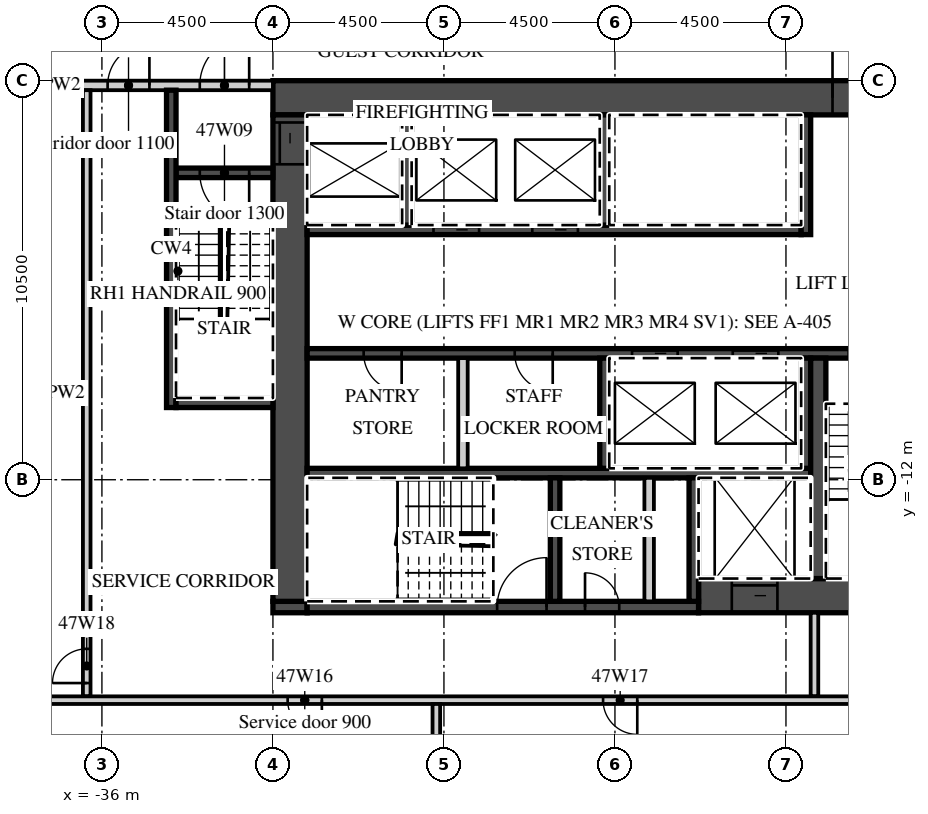
"""IFC4 building model, lengths in metres.
Left out: names, types, materials, properties, quantities, classifications, styles, units other than length and angle.
Written with IfcOpenShell. Run it as: python <this file> out.ifc"""

import sys

from ifc_helpers import new_model, si_unit, direction, frame, frame_2d, origin, place, context, subcontext, project, spatial, rectangle, extrude, element, fill, save


model = new_model("IFC4")
c1 = context("Model", 3, precision=1e-05, world=origin(), true_north=direction((0.0, 1.0)))
c2 = subcontext(c1, "Body", "Model", "MODEL_VIEW")
j1 = project(units=[si_unit("LENGTHUNIT", "METRE"), si_unit("PLANEANGLEUNIT", "RADIAN")], contexts=[c1])
p1 = place(None, origin())
s1 = spatial("IfcSite", under=j1, at=p1, CompositionType="ELEMENT")
p2 = place(p1, origin())
s2 = spatial("IfcBuilding", under=s1, at=p2, CompositionType="ELEMENT")
p3 = place(p2, frame((0.0, 0.0, 196.6)))
s3 = spatial("IfcBuildingStorey", under=s2, at=p3, CompositionType="ELEMENT", Elevation=196.6)
p4 = place(p3, frame((-31.5, -1.95, 0.0), z_axis=(0.0, 0.0, 1.0), x_axis=(1.0, 0.0, 0.0)))
e1 = element("IfcWall", 1, at=p4, inside=s3, PredefinedType="SHEAR", context=c2, shape_type="SweptSolid", body=[
    extrude(rectangle(XDim=18.0, YDim=0.9, at=frame_2d((9.0, 0.0))), origin(), (0.0, 0.0, 1.0), 3.02),
])
p5 = place(p4, frame((14.725, 0.0, 0.0)))
e2 = element("IfcOpeningElement", 2, at=p5, cuts=e1, PredefinedType="OPENING", context=c2, shape_type="SweptSolid", body=[
    extrude(rectangle(XDim=1.8, YDim=2.1, at=frame_2d((0.9, 1.05))), frame((0.0, 0.46, 0.0), z_axis=(0.0, -1.0, 0.0), x_axis=(1.0, 0.0, 0.0)), (0.0, 0.0, 1.0), 0.92),
])
p6 = place(p3, frame((-20.3, -15.05, 0.0), z_axis=(0.0, 0.0, 1.0), x_axis=(1.0, 0.0, 0.0)))
e3 = element("IfcWall", 3, at=p6, inside=s3, PredefinedType="SHEAR", context=c2, shape_type="SweptSolid", body=[
    extrude(rectangle(XDim=6.8, YDim=0.9, at=frame_2d((3.4, 0.0))), origin(), (0.0, 0.0, 1.0), 3.02),
])
p7 = place(p6, frame((0.875, 0.0, 0.0)))
e4 = element("IfcOpeningElement", 4, at=p7, cuts=e3, PredefinedType="OPENING", context=c2, shape_type="SweptSolid", body=[
    extrude(rectangle(XDim=1.2, YDim=2.1, at=frame_2d((0.6, 1.05))), frame((0.0, 0.46, 0.0), z_axis=(0.0, -1.0, 0.0), x_axis=(1.0, 0.0, 0.0)), (0.0, 0.0, 1.0), 0.92),
])
p8 = place(p3, frame((-31.5, -15.35, 0.0), z_axis=(0.0, 0.0, 1.0), x_axis=(1.0, 0.0, 0.0)))
e5 = element("IfcWall", 5, at=p8, inside=s3, PredefinedType="SHEAR", context=c2, shape_type="SweptSolid", body=[
    extrude(rectangle(XDim=0.9, YDim=0.3, at=frame_2d((0.45, 0.0))), origin(), (0.0, 0.0, 1.0), 3.02),
])
p9 = place(p3, frame((-30.6, -15.35, 0.0), z_axis=(0.0, 0.0, 1.0), x_axis=(1.0, 0.0, 0.0)))
e6 = element("IfcWall", 6, at=p9, inside=s3, PredefinedType="SHEAR", context=c2, shape_type="SweptSolid", body=[
    extrude(rectangle(XDim=10.3, YDim=0.3, at=frame_2d((5.15, 0.0))), origin(), (0.0, 0.0, 1.0), 3.02),
])
p10 = place(p9, frame((5.0, 0.0, 0.0)))
e7 = element("IfcOpeningElement", 7, at=p10, cuts=e6, PredefinedType="OPENING", context=c2, shape_type="SweptSolid", body=[
    extrude(rectangle(XDim=1.3, YDim=2.1, at=frame_2d((0.65, 1.05))), frame((0.0, 0.16, 0.0), z_axis=(0.0, -1.0, 0.0), x_axis=(1.0, 0.0, 0.0)), (0.0, 0.0, 1.0), 0.32),
])
p11 = place(p9, frame((7.312, 0.0, 0.0)))
e8 = element("IfcOpeningElement", 8, at=p11, cuts=e6, PredefinedType="OPENING", context=c2, shape_type="SweptSolid", body=[
    extrude(rectangle(XDim=0.9, YDim=2.1, at=frame_2d((0.45, 1.05))), frame((0.0, 0.16, 0.0), z_axis=(0.0, -1.0, 0.0), x_axis=(1.0, 0.0, 0.0)), (0.0, 0.0, 1.0), 0.32),
])
p12 = place(p3, frame((-31.05, -15.2, 0.0), z_axis=(0.0, 0.0, 1.0), x_axis=(0.0, 1.0, 0.0)))
e9 = element("IfcWall", 9, at=p12, inside=s3, PredefinedType="SHEAR", context=c2, shape_type="SweptSolid", body=[
    extrude(rectangle(XDim=12.8, YDim=0.9, at=frame_2d((6.4, 0.0))), origin(), (0.0, 0.0, 1.0), 3.02),
])
p13 = place(p12, frame((11.5, 0.0, 0.0)))
e10 = element("IfcOpeningElement", 10, at=p13, cuts=e9, PredefinedType="OPENING", context=c2, shape_type="SweptSolid", body=[
    extrude(rectangle(XDim=1.1, YDim=2.1, at=frame_2d((0.55, 1.05))), frame((0.0, 0.46, 0.0), z_axis=(0.0, -1.0, 0.0), x_axis=(1.0, 0.0, 0.0)), (0.0, 0.0, 1.0), 0.92),
])
p14 = place(p3, frame((-30.6, -5.425, 0.0), z_axis=(0.0, 0.0, 1.0), x_axis=(1.0, 0.0, 0.0)))
e11 = element("IfcWall", 11, at=p14, inside=s3, PredefinedType="SHEAR", context=c2, shape_type="SweptSolid", body=[
    extrude(rectangle(XDim=13.0, YDim=0.25, at=frame_2d((6.5, 0.0))), origin(), (0.0, 0.0, 1.0), 3.02),
])
p15 = place(p14, frame((3.325, 0.0, 0.0)))
e12 = element("IfcOpeningElement", 12, at=p15, cuts=e11, PredefinedType="OPENING", context=c2, shape_type="SweptSolid", body=[
    extrude(rectangle(XDim=1.2, YDim=2.1, at=frame_2d((0.6, 1.05))), frame((0.0, 0.135, 0.0), z_axis=(0.0, -1.0, 0.0), x_axis=(1.0, 0.0, 0.0)), (0.0, 0.0, 1.0), 0.27),
])
p16 = place(p14, frame((5.925, 0.0, 0.0)))
e13 = element("IfcOpeningElement", 13, at=p16, cuts=e11, PredefinedType="OPENING", context=c2, shape_type="SweptSolid", body=[
    extrude(rectangle(XDim=1.2, YDim=2.1, at=frame_2d((0.6, 1.05))), frame((0.0, 0.135, 0.0), z_axis=(0.0, -1.0, 0.0), x_axis=(1.0, 0.0, 0.0)), (0.0, 0.0, 1.0), 0.27),
])
p17 = place(p3, frame((-17.475, -5.55, 0.0), z_axis=(0.0, 0.0, 1.0), x_axis=(0.0, 1.0, 0.0)))
e14 = element("IfcWall", 14, at=p17, inside=s3, PredefinedType="SHEAR", context=c2, shape_type="SweptSolid", body=[
    extrude(rectangle(XDim=3.15, YDim=0.25, at=frame_2d((1.575, 0.0))), origin(), (0.0, 0.0, 1.0), 3.02),
])
for number, where, z_axis, x_axis in (
    (15, (-27.975, -5.3, 0.0), (0.0, 0.0, 1.0), (0.0, 1.0, 0.0)),
    (16, (-22.775, -5.3, 0.0), (0.0, 0.0, 1.0), (0.0, 1.0, 0.0)),
):
    element("IfcWall", number, at=place(p3, frame(where, z_axis=z_axis, x_axis=x_axis)), inside=s3, PredefinedType="SHEAR", context=c2, shape_type="SweptSolid", body=[
        extrude(rectangle(XDim=2.9, YDim=0.25, at=frame_2d((1.45, 0.0))), origin(), (0.0, 0.0, 1.0), 3.02),
    ])
p18 = place(p3, frame((-30.6, -8.675, 0.0), z_axis=(0.0, 0.0, 1.0), x_axis=(1.0, 0.0, 0.0)))
e17 = element("IfcWall", 17, at=p18, inside=s3, PredefinedType="SHEAR", context=c2, shape_type="SweptSolid", body=[
    extrude(rectangle(XDim=16.2, YDim=0.25, at=frame_2d((8.1, 0.0))), origin(), (0.0, 0.0, 1.0), 3.02),
])
p19 = place(p18, frame((8.55, 0.0, 0.0)))
e18 = element("IfcOpeningElement", 18, at=p19, cuts=e17, PredefinedType="OPENING", context=c2, shape_type="SweptSolid", body=[
    extrude(rectangle(XDim=1.2, YDim=2.1, at=frame_2d((0.6, 1.05))), frame((0.0, 0.135, 0.0), z_axis=(0.0, -1.0, 0.0), x_axis=(1.0, 0.0, 0.0)), (0.0, 0.0, 1.0), 0.27),
])
p20 = place(p18, frame((11.2, 0.0, 0.0)))
e19 = element("IfcOpeningElement", 19, at=p20, cuts=e17, PredefinedType="OPENING", context=c2, shape_type="SweptSolid", body=[
    extrude(rectangle(XDim=1.2, YDim=2.1, at=frame_2d((0.6, 1.05))), frame((0.0, 0.135, 0.0), z_axis=(0.0, -1.0, 0.0), x_axis=(1.0, 0.0, 0.0)), (0.0, 0.0, 1.0), 0.27),
])
p21 = place(p18, frame((14.25, 0.0, 0.0)))
e20 = element("IfcOpeningElement", 20, at=p21, cuts=e17, PredefinedType="OPENING", context=c2, shape_type="SweptSolid", body=[
    extrude(rectangle(XDim=1.3, YDim=2.1, at=frame_2d((0.65, 1.05))), frame((0.0, 0.135, 0.0), z_axis=(0.0, -1.0, 0.0), x_axis=(1.0, 0.0, 0.0)), (0.0, 0.0, 1.0), 0.27),
])
p22 = place(p18, frame((1.488, 0.0, 0.0)))
e21 = element("IfcOpeningElement", 21, at=p22, cuts=e17, PredefinedType="OPENING", context=c2, shape_type="SweptSolid", body=[
    extrude(rectangle(XDim=1.0, YDim=2.1, at=frame_2d((0.5, 1.05))), frame((0.0, 0.135, 0.0), z_axis=(0.0, -1.0, 0.0), x_axis=(1.0, 0.0, 0.0)), (0.0, 0.0, 1.0), 0.27),
])
p23 = place(p18, frame((5.462, 0.0, 0.0)))
e22 = element("IfcOpeningElement", 22, at=p23, cuts=e17, PredefinedType="OPENING", context=c2, shape_type="SweptSolid", body=[
    extrude(rectangle(XDim=1.0, YDim=2.1, at=frame_2d((0.5, 1.05))), frame((0.0, 0.135, 0.0), z_axis=(0.0, -1.0, 0.0), x_axis=(1.0, 0.0, 0.0)), (0.0, 0.0, 1.0), 0.27),
])
p24 = place(p3, frame((-30.6, -11.825, 0.0), z_axis=(0.0, 0.0, 1.0), x_axis=(1.0, 0.0, 0.0)))
e23 = element("IfcWall", 23, at=p24, inside=s3, PredefinedType="SHEAR", context=c2, shape_type="SweptSolid", body=[
    extrude(rectangle(XDim=13.25, YDim=0.25, at=frame_2d((6.625, 0.0))), origin(), (0.0, 0.0, 1.0), 3.02),
])
for number, where, z_axis, x_axis in (
    (24, (-17.475, -11.7, 0.0), (0.0, 0.0, 1.0), (0.0, 1.0, 0.0)),
    (25, (-22.775, -11.7, 0.0), (0.0, 0.0, 1.0), (0.0, 1.0, 0.0)),
):
    element("IfcWall", number, at=place(p3, frame(where, z_axis=z_axis, x_axis=x_axis)), inside=s3, PredefinedType="SHEAR", context=c2, shape_type="SweptSolid", body=[
        extrude(rectangle(XDim=2.9, YDim=0.25, at=frame_2d((1.45, 0.0))), origin(), (0.0, 0.0, 1.0), 3.02),
    ])
p25 = place(p3, frame((-26.5, -11.7, 0.0), z_axis=(0.0, 0.0, 1.0), x_axis=(0.0, 1.0, 0.0)))
e26 = element("IfcWall", 26, at=p25, inside=s3, PredefinedType="PARTITIONING", context=c2, shape_type="SweptSolid", body=[
    extrude(rectangle(XDim=2.9, YDim=0.25, at=frame_2d((1.45, 0.0))), origin(), (0.0, 0.0, 1.0), 3.02),
])
p26 = place(p3, frame((-17.15, -14.6, 0.0), z_axis=(0.0, 0.0, 1.0), x_axis=(0.0, 1.0, 0.0)))
e27 = element("IfcWall", 27, at=p26, inside=s3, PredefinedType="SHEAR", context=c2, shape_type="SweptSolid", body=[
    extrude(rectangle(XDim=5.8, YDim=0.4, at=frame_2d((2.9, 0.0))), origin(), (0.0, 0.0, 1.0), 3.02),
])
for number, where, z_axis, x_axis in (
    (28, (-20.425, -15.2, 0.0), (0.0, 0.0, 1.0), (0.0, 1.0, 0.0)),
    (29, (-24.075, -15.2, 0.0), (0.0, 0.0, 1.0), (0.0, 1.0, 0.0)),
):
    element("IfcWall", number, at=place(p3, frame(where, z_axis=z_axis, x_axis=x_axis)), inside=s3, PredefinedType="SHEAR", context=c2, shape_type="SweptSolid", body=[
        extrude(rectangle(XDim=3.25, YDim=0.25, at=frame_2d((1.625, 0.0))), origin(), (0.0, 0.0, 1.0), 3.02),
    ])
p27 = place(p3, frame((-21.6, -15.2, 0.0), z_axis=(0.0, 0.0, 1.0), x_axis=(0.0, 1.0, 0.0)))
e30 = element("IfcWall", 30, at=p27, inside=s3, PredefinedType="PARTITIONING", context=c2, shape_type="SweptSolid", body=[
    extrude(rectangle(XDim=3.25, YDim=0.25, at=frame_2d((1.625, 0.0))), origin(), (0.0, 0.0, 1.0), 3.02),
])
p28 = place(p3, frame((-42.632, -1.625, 0.0), z_axis=(0.0, 0.0, 1.0), x_axis=(1.0, 0.0, 0.0)))
e31 = element("IfcWall", 31, at=p28, inside=s3, PredefinedType="PARTITIONING", context=c2, shape_type="SweptSolid", body=[
    extrude(rectangle(XDim=11.132, YDim=0.25, at=frame_2d((5.566, 0.0))), origin(), (0.0, 0.0, 1.0), 3.02),
])
p29 = place(p28, frame((9.207, 0.0, 0.0)))
e32 = element("IfcOpeningElement", 32, at=p29, cuts=e31, PredefinedType="OPENING", context=c2, shape_type="SweptSolid", body=[
    extrude(rectangle(XDim=1.3, YDim=2.1, at=frame_2d((0.65, 1.05))), frame((0.0, 0.135, 0.0), z_axis=(0.0, -1.0, 0.0), x_axis=(1.0, 0.0, 0.0)), (0.0, 0.0, 1.0), 0.27),
])
p30 = place(p28, frame((6.781, 0.0, 0.0)))
e33 = element("IfcOpeningElement", 33, at=p30, cuts=e31, PredefinedType="OPENING", context=c2, shape_type="SweptSolid", body=[
    extrude(rectangle(XDim=1.1, YDim=2.1, at=frame_2d((0.55, 1.05))), frame((0.0, 0.135, 0.0), z_axis=(0.0, -1.0, 0.0), x_axis=(1.0, 0.0, 0.0)), (0.0, 0.0, 1.0), 0.27),
])
p31 = place(p3, frame((-34.05, -3.925, 0.0), z_axis=(0.0, 0.0, 1.0), x_axis=(1.0, 0.0, 0.0)))
e34 = element("IfcWall", 34, at=p31, inside=s3, PredefinedType="SHEAR", context=c2, shape_type="SweptSolid", body=[
    extrude(rectangle(XDim=2.55, YDim=0.25, at=frame_2d((1.275, 0.0))), origin(), (0.0, 0.0, 1.0), 3.02),
])
p32 = place(p31, frame((0.625, 0.0, 0.0)))
e35 = element("IfcOpeningElement", 35, at=p32, cuts=e34, PredefinedType="OPENING", context=c2, shape_type="SweptSolid", body=[
    extrude(rectangle(XDim=1.3, YDim=2.1, at=frame_2d((0.65, 1.05))), frame((0.0, 0.135, 0.0), z_axis=(0.0, -1.0, 0.0), x_axis=(1.0, 0.0, 0.0)), (0.0, 0.0, 1.0), 0.27),
])
p33 = place(p3, frame((-34.175, -10.1, 0.0), z_axis=(0.0, 0.0, 1.0), x_axis=(0.0, 1.0, 0.0)))
e36 = element("IfcWall", 36, at=p33, inside=s3, PredefinedType="SHEAR", context=c2, shape_type="SweptSolid", body=[
    extrude(rectangle(XDim=8.35, YDim=0.25, at=frame_2d((4.175, 0.0))), origin(), (0.0, 0.0, 1.0), 3.02),
])
p34 = place(p3, frame((-34.05, -9.975, 0.0), z_axis=(0.0, 0.0, 1.0), x_axis=(1.0, 0.0, 0.0)))
e37 = element("IfcWall", 37, at=p34, inside=s3, PredefinedType="SHEAR", context=c2, shape_type="SweptSolid", body=[
    extrude(rectangle(XDim=2.55, YDim=0.25, at=frame_2d((1.275, 0.0))), origin(), (0.0, 0.0, 1.0), 3.02),
])
p35 = place(p3, frame((-17.25, -17.7, 0.0), z_axis=(0.0, 0.0, 1.0), x_axis=(0.0, 1.0, 0.0)))
e38 = element("IfcWall", 38, at=p35, inside=s3, PredefinedType="PARTITIONING", context=c2, shape_type="SweptSolid", body=[
    extrude(rectangle(XDim=2.2, YDim=0.2, at=frame_2d((1.1, 0.0))), origin(), (0.0, 0.0, 1.0), 3.02),
])
p36 = place(p3, frame((-36.4, -17.7, 0.0), z_axis=(0.0, 0.0, 1.0), x_axis=(0.0, 1.0, 0.0)))
e39 = element("IfcWall", 39, at=p36, inside=s3, PredefinedType="PARTITIONING", context=c2, shape_type="SweptSolid", body=[
    extrude(rectangle(XDim=15.95, YDim=0.2, at=frame_2d((7.975, 0.0))), origin(), (0.0, 0.0, 1.0), 3.02),
])
p37 = place(p36, frame((0.35, 0.0, 0.0)))
e40 = element("IfcOpeningElement", 40, at=p37, cuts=e39, PredefinedType="OPENING", context=c2, shape_type="SweptSolid", body=[
    extrude(rectangle(XDim=0.9, YDim=2.1, at=frame_2d((0.45, 1.05))), frame((0.0, 0.11, 0.0), z_axis=(0.0, -1.0, 0.0), x_axis=(1.0, 0.0, 0.0)), (0.0, 0.0, 1.0), 0.22),
])
p38 = place(p3, frame((-41.074, -17.8, 0.0), z_axis=(0.0, 0.0, 1.0), x_axis=(1.0, 0.0, 0.0)))
e41 = element("IfcWall", 41, at=p38, inside=s3, PredefinedType="PARTITIONING", context=c2, shape_type="SweptSolid", body=[
    extrude(rectangle(XDim=27.474, YDim=0.2, at=frame_2d((13.737, 0.0))), origin(), (0.0, 0.0, 1.0), 3.02),
])
p39 = place(p38, frame((9.962, 0.0, 0.0)))
e42 = element("IfcOpeningElement", 42, at=p39, cuts=e41, PredefinedType="OPENING", context=c2, shape_type="SweptSolid", body=[
    extrude(rectangle(XDim=0.9, YDim=2.1, at=frame_2d((0.45, 1.05))), frame((0.0, 0.11, 0.0), z_axis=(0.0, -1.0, 0.0), x_axis=(1.0, 0.0, 0.0)), (0.0, 0.0, 1.0), 0.22),
])
p40 = place(p38, frame((18.262, 0.0, 0.0)))
e43 = element("IfcOpeningElement", 43, at=p40, cuts=e41, PredefinedType="OPENING", context=c2, shape_type="SweptSolid", body=[
    extrude(rectangle(XDim=0.9, YDim=2.1, at=frame_2d((0.45, 1.05))), frame((0.0, 0.11, 0.0), z_axis=(0.0, -1.0, 0.0), x_axis=(1.0, 0.0, 0.0)), (0.0, 0.0, 1.0), 0.22),
])
p41 = place(p3, frame((-27.2, -23.621, 0.0), z_axis=(0.0, 0.0, 1.0), x_axis=(0.0, 1.0, 0.0)))
e44 = element("IfcWall", 44, at=p41, inside=s3, PredefinedType="PARTITIONING", context=c2, shape_type="SweptSolid", body=[
    extrude(rectangle(XDim=5.721, YDim=0.2, at=frame_2d((2.86, 0.0))), origin(), (0.0, 0.0, 1.0), 3.02),
])
p42 = place(p19, origin())
e45 = element("IfcDoor", 45, at=p42, inside=s3, OperationType="SLIDING_TO_LEFT", PredefinedType="DOOR", context=c2, shape_type="SweptSolid", body=[
    extrude(rectangle(XDim=1.2, YDim=2.1, at=frame_2d((0.6, 1.05))), frame((0.0, 0.025, 0.0), z_axis=(0.0, -1.0, 0.0), x_axis=(1.0, 0.0, 0.0)), (0.0, 0.0, 1.0), 0.05),
])
fill(e18, e45)
p43 = place(p20, origin())
e46 = element("IfcDoor", 46, at=p43, inside=s3, OperationType="SLIDING_TO_RIGHT", PredefinedType="DOOR", context=c2, shape_type="SweptSolid", body=[
    extrude(rectangle(XDim=1.2, YDim=2.1, at=frame_2d((0.6, 1.05))), frame((0.0, 0.025, 0.0), z_axis=(0.0, -1.0, 0.0), x_axis=(1.0, 0.0, 0.0)), (0.0, 0.0, 1.0), 0.05),
])
fill(e19, e46)
p44 = place(p15, origin())
e47 = element("IfcDoor", 47, at=p44, inside=s3, OperationType="SLIDING_TO_RIGHT", PredefinedType="DOOR", context=c2, shape_type="SweptSolid", body=[
    extrude(rectangle(XDim=1.2, YDim=2.1, at=frame_2d((0.6, 1.05))), frame((0.0, 0.025, 0.0), z_axis=(0.0, -1.0, 0.0), x_axis=(1.0, 0.0, 0.0)), (0.0, 0.0, 1.0), 0.05),
])
fill(e12, e47)
p45 = place(p16, origin())
e48 = element("IfcDoor", 48, at=p45, inside=s3, OperationType="SLIDING_TO_RIGHT", PredefinedType="DOOR", context=c2, shape_type="SweptSolid", body=[
    extrude(rectangle(XDim=1.2, YDim=2.1, at=frame_2d((0.6, 1.05))), frame((0.0, 0.025, 0.0), z_axis=(0.0, -1.0, 0.0), x_axis=(1.0, 0.0, 0.0)), (0.0, 0.0, 1.0), 0.05),
])
fill(e13, e48)
p46 = place(p7, origin())
e49 = element("IfcDoor", 49, at=p46, inside=s3, OperationType="SLIDING_TO_LEFT", PredefinedType="DOOR", context=c2, shape_type="SweptSolid", body=[
    extrude(rectangle(XDim=1.2, YDim=2.1, at=frame_2d((0.6, 1.05))), frame((0.0, 0.025, 0.0), z_axis=(0.0, -1.0, 0.0), x_axis=(1.0, 0.0, 0.0)), (0.0, 0.0, 1.0), 0.05),
])
fill(e4, e49)
p47 = place(p13, origin())
e50 = element("IfcDoor", 50, at=p47, inside=s3, OperationType="SLIDING_TO_RIGHT", PredefinedType="DOOR", context=c2, shape_type="SweptSolid", body=[
    extrude(rectangle(XDim=1.1, YDim=2.1, at=frame_2d((0.55, 1.05))), frame((0.0, 0.025, 0.0), z_axis=(0.0, -1.0, 0.0), x_axis=(1.0, 0.0, 0.0)), (0.0, 0.0, 1.0), 0.05),
])
fill(e10, e50)
p48 = place(p5, origin())
e51 = element("IfcDoor", 51, at=p48, inside=s3, OperationType="DOUBLE_DOOR_DOUBLE_SWING", PredefinedType="DOOR", context=c2, shape_type="SweptSolid", body=[
    extrude(rectangle(XDim=1.8, YDim=2.1, at=frame_2d((0.9, 1.05))), frame((0.0, 0.025, 0.0), z_axis=(0.0, -1.0, 0.0), x_axis=(1.0, 0.0, 0.0)), (0.0, 0.0, 1.0), 0.05),
])
fill(e2, e51)
p49 = place(p29, origin())
e52 = element("IfcDoor", 52, at=p49, inside=s3, OperationType="SINGLE_SWING_RIGHT", PredefinedType="DOOR", context=c2, shape_type="SweptSolid", body=[
    extrude(rectangle(XDim=1.3, YDim=2.1, at=frame_2d((0.65, 1.05))), frame((0.0, 0.025, 0.0), z_axis=(0.0, -1.0, 0.0), x_axis=(1.0, 0.0, 0.0)), (0.0, 0.0, 1.0), 0.05),
])
fill(e32, e52)
p50 = place(p32, origin())
e53 = element("IfcDoor", 53, at=p50, inside=s3, OperationType="SINGLE_SWING_RIGHT", PredefinedType="DOOR", context=c2, shape_type="SweptSolid", body=[
    extrude(rectangle(XDim=1.3, YDim=2.1, at=frame_2d((0.65, 1.05))), frame((0.0, 0.025, 0.0), z_axis=(0.0, -1.0, 0.0), x_axis=(1.0, 0.0, 0.0)), (0.0, 0.0, 1.0), 0.05),
])
fill(e35, e53)
p51 = place(p30, origin())
e54 = element("IfcDoor", 54, at=p51, inside=s3, OperationType="SINGLE_SWING_RIGHT", PredefinedType="DOOR", context=c2, shape_type="SweptSolid", body=[
    extrude(rectangle(XDim=1.1, YDim=2.1, at=frame_2d((0.55, 1.05))), frame((0.0, 0.025, 0.0), z_axis=(0.0, -1.0, 0.0), x_axis=(1.0, 0.0, 0.0)), (0.0, 0.0, 1.0), 0.05),
])
fill(e33, e54)
p52 = place(p21, origin())
e55 = element("IfcDoor", 55, at=p52, inside=s3, OperationType="SINGLE_SWING_RIGHT", PredefinedType="DOOR", context=c2, shape_type="SweptSolid", body=[
    extrude(rectangle(XDim=1.3, YDim=2.1, at=frame_2d((0.65, 1.05))), frame((0.0, 0.025, 0.0), z_axis=(0.0, -1.0, 0.0), x_axis=(1.0, 0.0, 0.0)), (0.0, 0.0, 1.0), 0.05),
])
fill(e20, e55)
p53 = place(p10, origin())
e56 = element("IfcDoor", 56, at=p53, inside=s3, OperationType="SINGLE_SWING_RIGHT", PredefinedType="DOOR", context=c2, shape_type="SweptSolid", body=[
    extrude(rectangle(XDim=1.3, YDim=2.1, at=frame_2d((0.65, 1.05))), frame((0.0, 0.025, 0.0), z_axis=(0.0, -1.0, 0.0), x_axis=(1.0, 0.0, 0.0)), (0.0, 0.0, 1.0), 0.05),
])
fill(e7, e56)
p54 = place(p11, origin())
e57 = element("IfcDoor", 57, at=p54, inside=s3, OperationType="SINGLE_SWING_LEFT", PredefinedType="DOOR", context=c2, shape_type="SweptSolid", body=[
    extrude(rectangle(XDim=0.9, YDim=2.1, at=frame_2d((0.45, 1.05))), frame((0.0, 0.025, 0.0), z_axis=(0.0, -1.0, 0.0), x_axis=(1.0, 0.0, 0.0)), (0.0, 0.0, 1.0), 0.05),
])
fill(e8, e57)
p55 = place(p22, origin())
e58 = element("IfcDoor", 58, at=p55, inside=s3, OperationType="SINGLE_SWING_RIGHT", PredefinedType="DOOR", context=c2, shape_type="SweptSolid", body=[
    extrude(rectangle(XDim=1.0, YDim=2.1, at=frame_2d((0.5, 1.05))), frame((0.0, 0.025, 0.0), z_axis=(0.0, -1.0, 0.0), x_axis=(1.0, 0.0, 0.0)), (0.0, 0.0, 1.0), 0.05),
])
fill(e21, e58)
p56 = place(p23, origin())
e59 = element("IfcDoor", 59, at=p56, inside=s3, OperationType="SINGLE_SWING_RIGHT", PredefinedType="DOOR", context=c2, shape_type="SweptSolid", body=[
    extrude(rectangle(XDim=1.0, YDim=2.1, at=frame_2d((0.5, 1.05))), frame((0.0, 0.025, 0.0), z_axis=(0.0, -1.0, 0.0), x_axis=(1.0, 0.0, 0.0)), (0.0, 0.0, 1.0), 0.05),
])
fill(e22, e59)
p57 = place(p39, origin())
e60 = element("IfcDoor", 60, at=p57, inside=s3, OperationType="SINGLE_SWING_RIGHT", PredefinedType="DOOR", context=c2, shape_type="SweptSolid", body=[
    extrude(rectangle(XDim=0.9, YDim=2.1, at=frame_2d((0.45, 1.05))), frame((0.0, 0.025, 0.0), z_axis=(0.0, -1.0, 0.0), x_axis=(1.0, 0.0, 0.0)), (0.0, 0.0, 1.0), 0.05),
])
fill(e42, e60)
p58 = place(p40, origin())
e61 = element("IfcDoor", 61, at=p58, inside=s3, OperationType="SINGLE_SWING_RIGHT", PredefinedType="DOOR", context=c2, shape_type="SweptSolid", body=[
    extrude(rectangle(XDim=0.9, YDim=2.1, at=frame_2d((0.45, 1.05))), frame((0.0, 0.025, 0.0), z_axis=(0.0, -1.0, 0.0), x_axis=(1.0, 0.0, 0.0)), (0.0, 0.0, 1.0), 0.05),
])
fill(e43, e61)
p59 = place(p37, origin())
e62 = element("IfcDoor", 62, at=p59, inside=s3, OperationType="SINGLE_SWING_LEFT", PredefinedType="DOOR", context=c2, shape_type="SweptSolid", body=[
    extrude(rectangle(XDim=0.9, YDim=2.1, at=frame_2d((0.45, 1.05))), frame((0.0, 0.025, 0.0), z_axis=(0.0, -1.0, 0.0), x_axis=(1.0, 0.0, 0.0)), (0.0, 0.0, 1.0), 0.05),
])
fill(e40, e62)
save(model, sys.argv[1])
